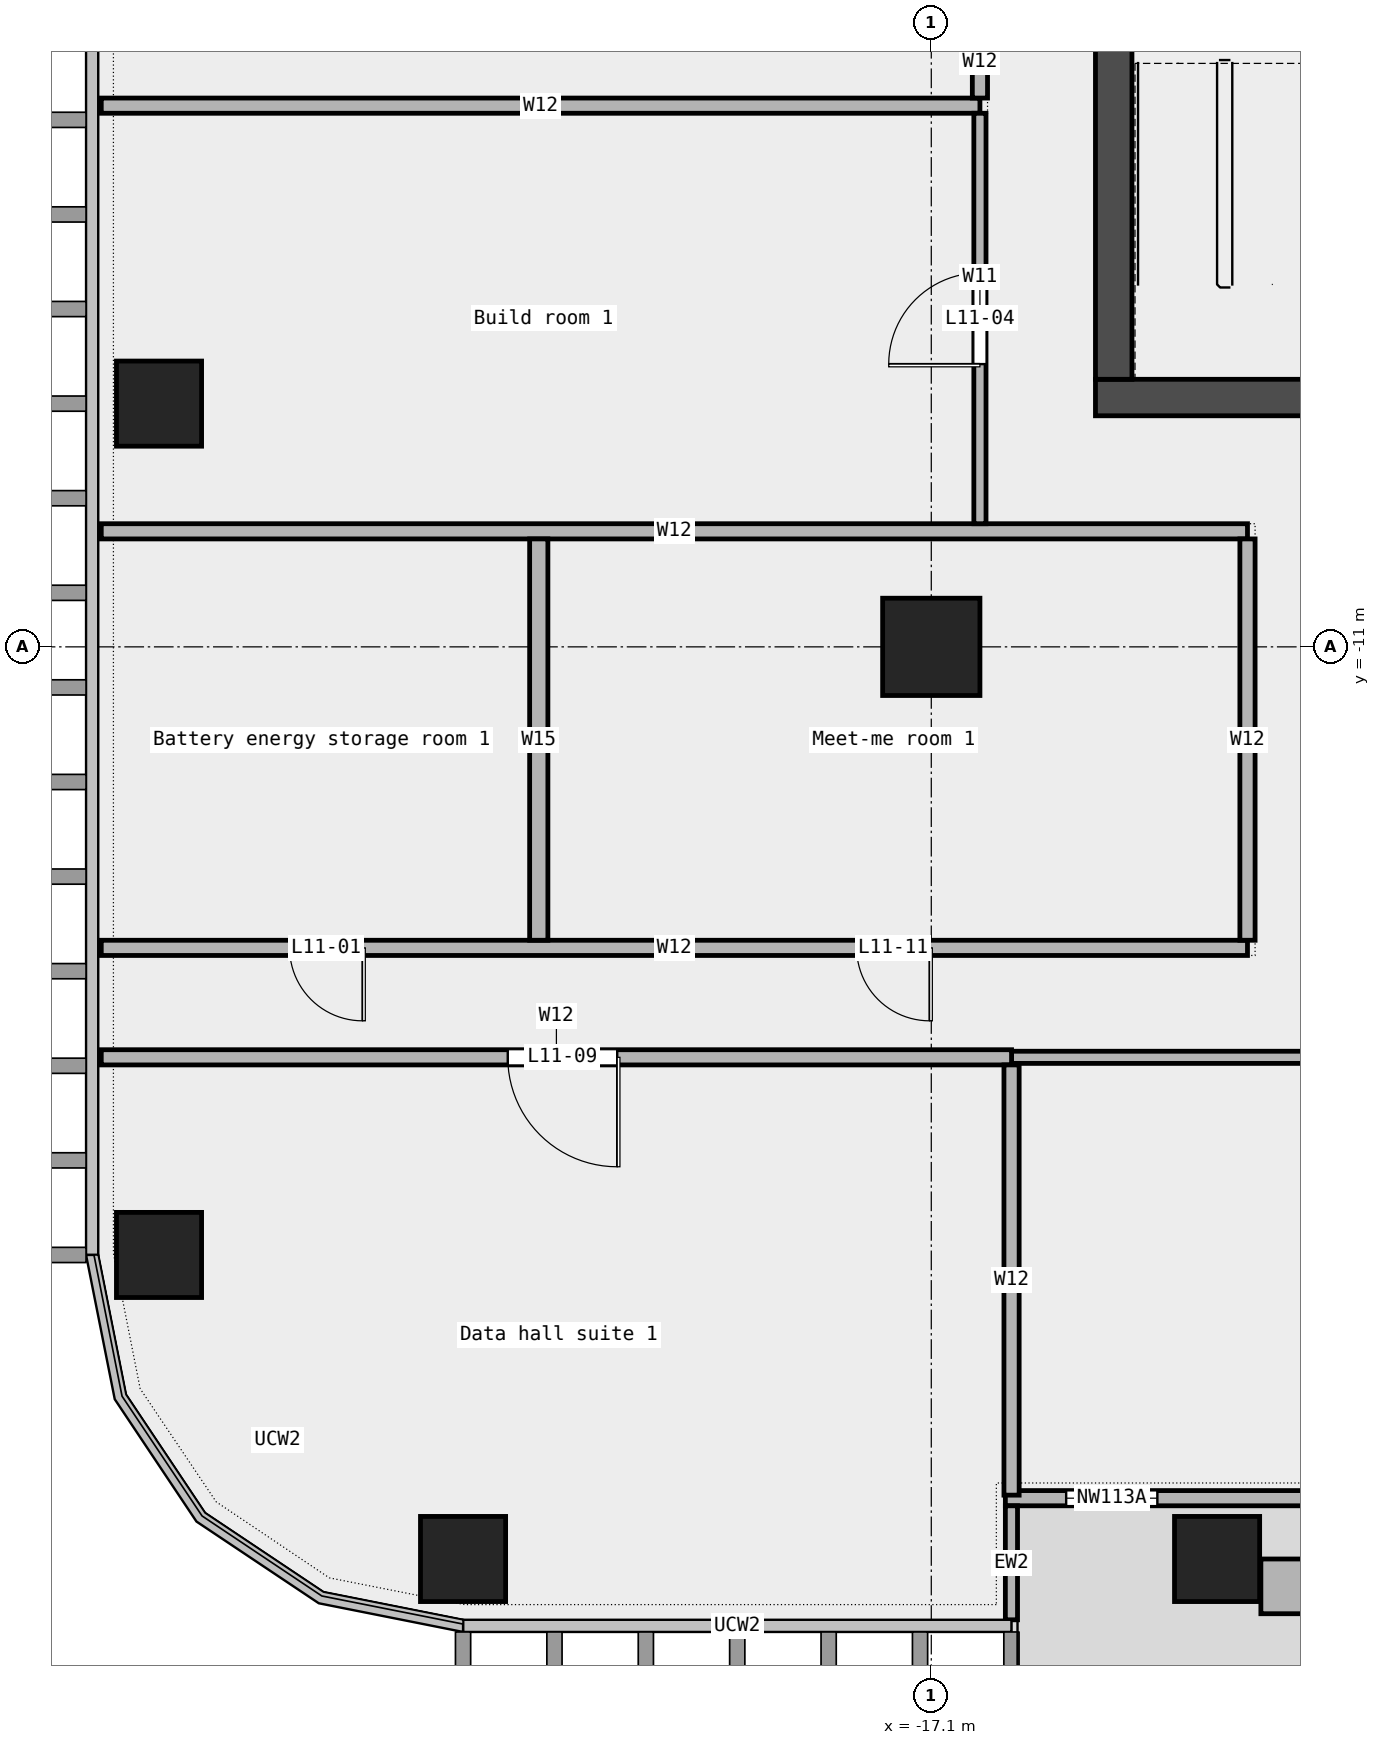
"""IFC4 building model, lengths in metres.
Left out: names, types, materials, properties, quantities, classifications, styles, units other than length and angle.
Written with IfcOpenShell. Run it as: python <this file> out.ifc"""

import sys

from ifc_helpers import new_model, si_unit, direction, frame, frame_2d, origin, origin_2d, place, context, subcontext, project, spatial, rectangle, extrude, element, fill, save


model = new_model("IFC4")
c1 = context("Model", 3, precision=1e-05, world=origin(), true_north=direction((0.0, 1.0)))
c2 = subcontext(c1, "Body", "Model", "MODEL_VIEW")
j1 = project(units=[si_unit("LENGTHUNIT", "METRE"), si_unit("PLANEANGLEUNIT", "RADIAN")], contexts=[c1])
p1 = place(None, origin())
s1 = spatial("IfcSite", under=j1, at=p1, CompositionType="ELEMENT")
p2 = place(p1, origin())
s2 = spatial("IfcBuilding", under=s1, at=p2, CompositionType="ELEMENT")
p3 = place(p2, frame((0.0, 0.0, 59.8)))
s3 = spatial("IfcBuildingStorey", under=s2, at=p3, CompositionType="ELEMENT", Elevation=59.8)
for number, where, z_axis, x_axis in (
    (1, (-24.8, -26.0, 0.0), (0.0, 0.0, 1.0), (1.0, 0.0, 0.0)),
    (2, (-12.4, -26.0, 0.0), (0.0, 0.0, 1.0), (1.0, 0.0, 0.0)),
    (3, (-29.8, -7.0, 0.0), (0.0, 0.0, 1.0), (1.0, 0.0, 0.0)),
    (4, (-29.8, -21.0, 0.0), (0.0, 0.0, 1.0), (1.0, 0.0, 0.0)),
):
    element("IfcColumn", number, at=place(p3, frame(where, z_axis=z_axis, x_axis=x_axis)), inside=s3, PredefinedType="COLUMN", context=c2, shape_type="SweptSolid", body=[
        extrude(rectangle(XDim=1.4, YDim=1.4, at=origin_2d()), origin(), (0.0, 0.0, 1.0), 4.35),
    ])
p4 = place(p3, frame((-17.1, -11.0, 0.0), z_axis=(0.0, 0.0, 1.0), x_axis=(1.0, 0.0, 0.0)))
e5 = element("IfcColumn", 5, at=p4, inside=s3, PredefinedType="COLUMN", context=c2, shape_type="SweptSolid", body=[
    extrude(rectangle(XDim=1.6, YDim=1.6, at=origin_2d()), origin(), (0.0, 0.0, 1.0), 4.35),
])
p5 = place(p3, frame((-15.882, -25.0, 0.0), z_axis=(0.0, 0.0, 1.0), x_axis=(1.0, 0.0, 0.0)))
e6 = element("IfcWall", 6, at=p5, inside=s3, PredefinedType="STANDARD", context=c2, shape_type="SweptSolid", body=[
    extrude(rectangle(XDim=13.727, YDim=0.25, at=frame_2d((6.864, 0.0))), origin(), (0.0, 0.0, 1.0), 4.35),
])
p6 = place(p5, frame((1.0, 0.0, 0.45)))
e7 = element("IfcOpeningElement", 7, at=p6, cuts=e6, PredefinedType="OPENING", context=c2, shape_type="SweptSolid", body=[
    extrude(rectangle(XDim=1.5, YDim=3.0, at=frame_2d((0.75, 1.5))), frame((0.0, 0.137, 0.0), z_axis=(0.0, -1.0, 0.0), x_axis=(1.0, 0.0, 0.0)), (0.0, 0.0, 1.0), 0.274),
])
p7 = place(p5, frame((6.0, 0.0, 0.0)))
e8 = element("IfcOpeningElement", 8, at=p7, cuts=e6, PredefinedType="OPENING", context=c2, shape_type="SweptSolid", body=[
    extrude(rectangle(XDim=1.8, YDim=2.4, at=frame_2d((0.9, 1.2))), frame((0.0, 0.137, 0.0), z_axis=(0.0, -1.0, 0.0), x_axis=(1.0, 0.0, 0.0)), (0.0, 0.0, 1.0), 0.274),
])
p8 = place(p5, frame((10.5, 0.0, 0.45)))
e9 = element("IfcOpeningElement", 9, at=p8, cuts=e6, PredefinedType="OPENING", context=c2, shape_type="SweptSolid", body=[
    extrude(rectangle(XDim=1.5, YDim=3.0, at=frame_2d((0.75, 1.5))), frame((0.0, 0.137, 0.0), z_axis=(0.0, -1.0, 0.0), x_axis=(1.0, 0.0, 0.0)), (0.0, 0.0, 1.0), 0.274),
])
p9 = place(p3, frame((-15.782, -27.0, 0.0), z_axis=(0.0, 0.0, 1.0), x_axis=(0.0, 1.0, 0.0)))
e10 = element("IfcWall", 10, at=p9, inside=s3, PredefinedType="STANDARD", context=c2, shape_type="SweptSolid", body=[
    extrude(rectangle(XDim=1.875, YDim=0.2, at=frame_2d((0.938, 0.0))), origin(), (0.0, 0.0, 1.0), 4.35),
])
p10 = place(p3, frame((-11.68, -26.45, 0.0), z_axis=(0.0, 0.0, 1.0), x_axis=(1.0, 0.0, 0.0)))
e11 = element("IfcWall", 11, at=p10, inside=s3, PredefinedType="STANDARD", context=c2, shape_type="SweptSolid", body=[
    extrude(rectangle(XDim=3.6, YDim=0.9, at=frame_2d((1.8, 0.0))), origin(), (0.0, 0.0, 1.0), 0.7),
])
p11 = place(p3, frame((-15.78, -17.75, 0.0), z_axis=(0.0, 0.0, 1.0), x_axis=(1.0, 0.0, 0.0)))
e12 = element("IfcWall", 12, at=p11, inside=s3, PredefinedType="PARTITIONING", context=c2, shape_type="SweptSolid", body=[
    extrude(rectangle(XDim=46.53, YDim=0.2, at=frame_2d((23.265, 0.0))), origin(), (0.0, 0.0, 1.0), 4.35),
])
p12 = place(p11, frame((29.028, 0.0, 0.0)))
e13 = element("IfcOpeningElement", 13, at=p12, cuts=e12, PredefinedType="OPENING", context=c2, shape_type="SweptSolid", body=[
    extrude(rectangle(XDim=1.8, YDim=2.1, at=frame_2d((0.9, 1.05))), frame((0.0, 0.112, 0.0), z_axis=(0.0, -1.0, 0.0), x_axis=(1.0, 0.0, 0.0)), (0.0, 0.0, 1.0), 0.224),
])
p13 = place(p11, frame((6.012, 0.0, 0.0)))
e14 = element("IfcOpeningElement", 14, at=p13, cuts=e12, PredefinedType="OPENING", context=c2, shape_type="SweptSolid", body=[
    extrude(rectangle(XDim=1.5, YDim=2.1, at=frame_2d((0.75, 1.05))), frame((0.0, 0.112, 0.0), z_axis=(0.0, -1.0, 0.0), x_axis=(1.0, 0.0, 0.0)), (0.0, 0.0, 1.0), 0.224),
])
p14 = place(p3, frame((-30.75, -17.75, 0.0), z_axis=(0.0, 0.0, 1.0), x_axis=(1.0, 0.0, 0.0)))
e15 = element("IfcWall", 15, at=p14, inside=s3, PredefinedType="PARTITIONING", context=c2, shape_type="SweptSolid", body=[
    extrude(rectangle(XDim=14.97, YDim=0.25, at=frame_2d((7.485, 0.0))), origin(), (0.0, 0.0, 1.0), 4.35),
])
p15 = place(p14, frame((6.685, 0.0, 0.0)))
e16 = element("IfcOpeningElement", 16, at=p15, cuts=e15, PredefinedType="OPENING", context=c2, shape_type="SweptSolid", body=[
    extrude(rectangle(XDim=1.8, YDim=2.1, at=frame_2d((0.9, 1.05))), frame((0.0, 0.137, 0.0), z_axis=(0.0, -1.0, 0.0), x_axis=(1.0, 0.0, 0.0)), (0.0, 0.0, 1.0), 0.274),
])
p16 = place(p3, frame((-30.75, -15.95, 0.0), z_axis=(0.0, 0.0, 1.0), x_axis=(1.0, 0.0, 0.0)))
e17 = element("IfcWall", 17, at=p16, inside=s3, PredefinedType="PARTITIONING", context=c2, shape_type="SweptSolid", body=[
    extrude(rectangle(XDim=18.85, YDim=0.25, at=frame_2d((9.425, 0.0))), origin(), (0.0, 0.0, 1.0), 4.35),
])
p17 = place(p16, frame((3.097, 0.0, 0.0)))
e18 = element("IfcOpeningElement", 18, at=p17, cuts=e17, PredefinedType="OPENING", context=c2, shape_type="SweptSolid", body=[
    extrude(rectangle(XDim=1.2, YDim=2.1, at=frame_2d((0.6, 1.05))), frame((0.0, 0.137, 0.0), z_axis=(0.0, -1.0, 0.0), x_axis=(1.0, 0.0, 0.0)), (0.0, 0.0, 1.0), 0.274),
])
p18 = place(p16, frame((12.423, 0.0, 0.0)))
e19 = element("IfcOpeningElement", 19, at=p18, cuts=e17, PredefinedType="OPENING", context=c2, shape_type="SweptSolid", body=[
    extrude(rectangle(XDim=1.2, YDim=2.1, at=frame_2d((0.6, 1.05))), frame((0.0, 0.137, 0.0), z_axis=(0.0, -1.0, 0.0), x_axis=(1.0, 0.0, 0.0)), (0.0, 0.0, 1.0), 0.274),
])
p19 = place(p3, frame((-30.75, -9.1, 0.0), z_axis=(0.0, 0.0, 1.0), x_axis=(1.0, 0.0, 0.0)))
e20 = element("IfcWall", 20, at=p19, inside=s3, PredefinedType="PARTITIONING", context=c2, shape_type="SweptSolid", body=[
    extrude(rectangle(XDim=18.85, YDim=0.25, at=frame_2d((9.425, 0.0))), origin(), (0.0, 0.0, 1.0), 4.35),
])
p20 = place(p3, frame((-30.75, -2.1, 0.0), z_axis=(0.0, 0.0, 1.0), x_axis=(1.0, 0.0, 0.0)))
e21 = element("IfcWall", 21, at=p20, inside=s3, PredefinedType="PARTITIONING", context=c2, shape_type="SweptSolid", body=[
    extrude(rectangle(XDim=14.45, YDim=0.25, at=frame_2d((7.225, 0.0))), origin(), (0.0, 0.0, 1.0), 4.35),
])
p21 = place(p3, frame((-23.555, -15.825, 0.0), z_axis=(0.0, 0.0, 1.0), x_axis=(0.0, 1.0, 0.0)))
e22 = element("IfcWall", 22, at=p21, inside=s3, PredefinedType="PARTITIONING", context=c2, shape_type="SweptSolid", body=[
    extrude(rectangle(XDim=6.6, YDim=0.3, at=frame_2d((3.3, 0.0))), origin(), (0.0, 0.0, 1.0), 4.35),
])
p22 = place(p3, frame((-16.3, -8.975, 0.0), z_axis=(0.0, 0.0, 1.0), x_axis=(0.0, 1.0, 0.0)))
e23 = element("IfcWall", 23, at=p22, inside=s3, PredefinedType="PARTITIONING", context=c2, shape_type="SweptSolid", body=[
    extrude(rectangle(XDim=6.75, YDim=0.2, at=frame_2d((3.375, 0.0))), origin(), (0.0, 0.0, 1.0), 4.35),
])
p23 = place(p22, frame((2.625, 0.0, 0.0)))
e24 = element("IfcOpeningElement", 24, at=p23, cuts=e23, PredefinedType="OPENING", context=c2, shape_type="SweptSolid", body=[
    extrude(rectangle(XDim=1.5, YDim=2.1, at=frame_2d((0.75, 1.05))), frame((0.0, 0.112, 0.0), z_axis=(0.0, -1.0, 0.0), x_axis=(1.0, 0.0, 0.0)), (0.0, 0.0, 1.0), 0.224),
])
p24 = place(p3, frame((-16.3, -1.975, 0.0), z_axis=(0.0, 0.0, 1.0), x_axis=(0.0, 1.0, 0.0)))
e25 = element("IfcWall", 25, at=p24, inside=s3, PredefinedType="PARTITIONING", context=c2, shape_type="SweptSolid", body=[
    extrude(rectangle(XDim=1.175, YDim=0.25, at=frame_2d((0.587, 0.0))), origin(), (0.0, 0.0, 1.0), 4.35),
])
p25 = place(p3, frame((-15.78, -24.95, 0.0), z_axis=(0.0, 0.0, 1.0), x_axis=(0.0, 1.0, 0.0)))
e26 = element("IfcWall", 26, at=p25, inside=s3, PredefinedType="PARTITIONING", context=c2, shape_type="SweptSolid", body=[
    extrude(rectangle(XDim=7.075, YDim=0.25, at=frame_2d((3.538, 0.0))), origin(), (0.0, 0.0, 1.0), 4.35),
])
p26 = place(p3, frame((-11.9, -15.825, 0.0), z_axis=(0.0, 0.0, 1.0), x_axis=(0.0, 1.0, 0.0)))
e27 = element("IfcWall", 27, at=p26, inside=s3, PredefinedType="PARTITIONING", context=c2, shape_type="SweptSolid", body=[
    extrude(rectangle(XDim=6.6, YDim=0.25, at=frame_2d((3.3, 0.0))), origin(), (0.0, 0.0, 1.0), 4.35),
])
p27 = place(p3, frame((-14.4, -6.9, 0.0), z_axis=(0.0, 0.0, 1.0), x_axis=(1.0, 0.0, 0.0)))
e28 = element("IfcWall", 28, at=p27, inside=s3, PredefinedType="SHEAR", context=c2, shape_type="SweptSolid", body=[
    extrude(rectangle(XDim=28.8, YDim=0.6, at=frame_2d((14.4, 0.0))), origin(), (0.0, 0.0, 1.0), 4.5),
])
p28 = place(p27, frame((4.337, 0.0, 0.0)))
e29 = element("IfcOpeningElement", 29, at=p28, cuts=e28, PredefinedType="OPENING", context=c2, shape_type="SweptSolid", body=[
    extrude(rectangle(XDim=1.0, YDim=2.1, at=frame_2d((0.5, 1.05))), frame((0.0, 0.312, 0.0), z_axis=(0.0, -1.0, 0.0), x_axis=(1.0, 0.0, 0.0)), (0.0, 0.0, 1.0), 0.624),
])
p29 = place(p27, frame((6.212, 0.0, 0.0)))
e30 = element("IfcOpeningElement", 30, at=p29, cuts=e28, PredefinedType="OPENING", context=c2, shape_type="SweptSolid", body=[
    extrude(rectangle(XDim=1.0, YDim=2.1, at=frame_2d((0.5, 1.05))), frame((0.0, 0.312, 0.0), z_axis=(0.0, -1.0, 0.0), x_axis=(1.0, 0.0, 0.0)), (0.0, 0.0, 1.0), 0.624),
])
p30 = place(p27, frame((10.8, 0.0, 0.0)))
e31 = element("IfcOpeningElement", 31, at=p30, cuts=e28, PredefinedType="OPENING", context=c2, shape_type="SweptSolid", body=[
    extrude(rectangle(XDim=1.2, YDim=2.1, at=frame_2d((0.6, 1.05))), frame((0.0, 0.312, 0.0), z_axis=(0.0, -1.0, 0.0), x_axis=(1.0, 0.0, 0.0)), (0.0, 0.0, 1.0), 0.624),
])
p31 = place(p27, frame((15.587, 0.0, 0.0)))
e32 = element("IfcOpeningElement", 32, at=p31, cuts=e28, PredefinedType="OPENING", context=c2, shape_type="SweptSolid", body=[
    extrude(rectangle(XDim=1.0, YDim=2.1, at=frame_2d((0.5, 1.05))), frame((0.0, 0.312, 0.0), z_axis=(0.0, -1.0, 0.0), x_axis=(1.0, 0.0, 0.0)), (0.0, 0.0, 1.0), 0.624),
])
p32 = place(p27, frame((18.75, 0.0, 0.0)))
e33 = element("IfcOpeningElement", 33, at=p32, cuts=e28, PredefinedType="OPENING", context=c2, shape_type="SweptSolid", body=[
    extrude(rectangle(XDim=1.8, YDim=2.1, at=frame_2d((0.9, 1.05))), frame((0.0, 0.312, 0.0), z_axis=(0.0, -1.0, 0.0), x_axis=(1.0, 0.0, 0.0)), (0.0, 0.0, 1.0), 0.624),
])
p33 = place(p27, frame((23.087, 0.0, 0.0)))
e34 = element("IfcOpeningElement", 34, at=p33, cuts=e28, PredefinedType="OPENING", context=c2, shape_type="SweptSolid", body=[
    extrude(rectangle(XDim=1.0, YDim=2.1, at=frame_2d((0.5, 1.05))), frame((0.0, 0.312, 0.0), z_axis=(0.0, -1.0, 0.0), x_axis=(1.0, 0.0, 0.0)), (0.0, 0.0, 1.0), 0.624),
])
p34 = place(p3, frame((-14.1, -6.6, 0.0), z_axis=(0.0, 0.0, 1.0), x_axis=(0.0, 1.0, 0.0)))
e35 = element("IfcWall", 35, at=p34, inside=s3, PredefinedType="SHEAR", context=c2, shape_type="SweptSolid", body=[
    extrude(rectangle(XDim=19.5, YDim=0.6, at=frame_2d((9.75, 0.0))), origin(), (0.0, 0.0, 1.0), 4.5),
])
p35 = place(p34, frame((9.3, 0.0, 0.0)))
e36 = element("IfcOpeningElement", 36, at=p35, cuts=e35, PredefinedType="OPENING", context=c2, shape_type="SweptSolid", body=[
    extrude(rectangle(XDim=1.8, YDim=2.1, at=frame_2d((0.9, 1.05))), frame((0.0, 0.312, 0.0), z_axis=(0.0, -1.0, 0.0), x_axis=(1.0, 0.0, 0.0)), (0.0, 0.0, 1.0), 0.624),
])
p36 = place(p6, origin())
e37 = element("IfcWindow", 37, at=p36, inside=s3, PartitioningType="SINGLE_PANEL", PredefinedType="WINDOW", context=c2, shape_type="SweptSolid", body=[
    extrude(rectangle(XDim=1.5, YDim=3.0, at=frame_2d((0.75, 1.5))), frame((0.0, 0.03, 0.0), z_axis=(0.0, -1.0, 0.0), x_axis=(1.0, 0.0, 0.0)), (0.0, 0.0, 1.0), 0.06),
])
fill(e7, e37)
p37 = place(p17, origin())
e38 = element("IfcDoor", 38, at=p37, inside=s3, OperationType="SINGLE_SWING_LEFT", PredefinedType="DOOR", context=c2, shape_type="SweptSolid", body=[
    extrude(rectangle(XDim=1.2, YDim=2.1, at=frame_2d((0.6, 1.05))), frame((0.0, 0.025, 0.0), z_axis=(0.0, -1.0, 0.0), x_axis=(1.0, 0.0, 0.0)), (0.0, 0.0, 1.0), 0.05),
])
fill(e18, e38)
p38 = place(p23, origin())
e39 = element("IfcDoor", 39, at=p38, inside=s3, OperationType="DOUBLE_DOOR_SINGLE_SWING", PredefinedType="DOOR", context=c2, shape_type="SweptSolid", body=[
    extrude(rectangle(XDim=1.5, YDim=2.1, at=frame_2d((0.75, 1.05))), frame((0.0, 0.025, 0.0), z_axis=(0.0, -1.0, 0.0), x_axis=(1.0, 0.0, 0.0)), (0.0, 0.0, 1.0), 0.05),
])
fill(e24, e39)
p39 = place(p15, origin())
e40 = element("IfcDoor", 40, at=p39, inside=s3, OperationType="DOUBLE_DOOR_SINGLE_SWING", PredefinedType="DOOR", context=c2, shape_type="SweptSolid", body=[
    extrude(rectangle(XDim=1.8, YDim=2.1, at=frame_2d((0.9, 1.05))), frame((0.0, 0.025, 0.0), z_axis=(0.0, -1.0, 0.0), x_axis=(1.0, 0.0, 0.0)), (0.0, 0.0, 1.0), 0.05),
])
fill(e16, e40)
p40 = place(p18, origin())
e41 = element("IfcDoor", 41, at=p40, inside=s3, OperationType="SINGLE_SWING_LEFT", PredefinedType="DOOR", context=c2, shape_type="SweptSolid", body=[
    extrude(rectangle(XDim=1.2, YDim=2.1, at=frame_2d((0.6, 1.05))), frame((0.0, 0.025, 0.0), z_axis=(0.0, -1.0, 0.0), x_axis=(1.0, 0.0, 0.0)), (0.0, 0.0, 1.0), 0.05),
])
fill(e19, e41)
save(model, sys.argv[1])
